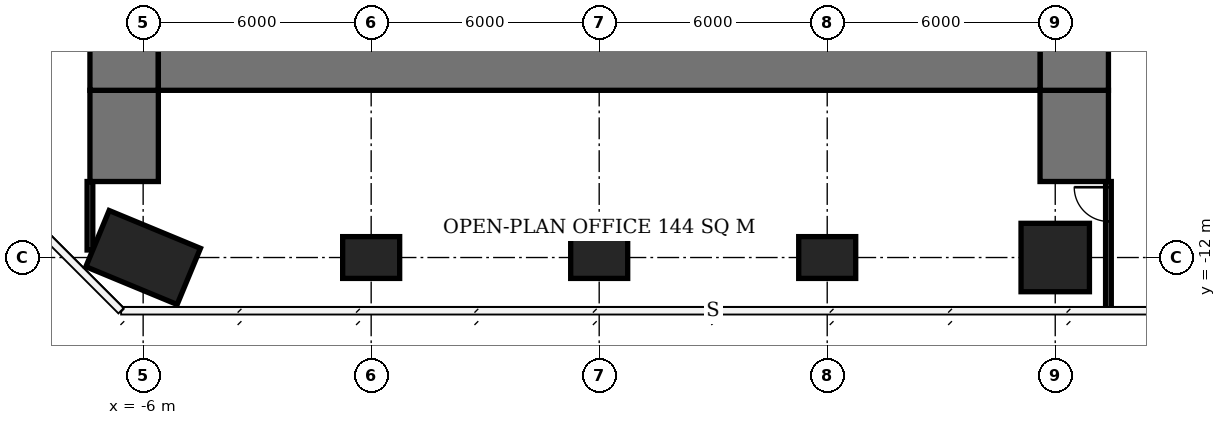
"""IFC4 building model, lengths in metres.
Left out: names, types, materials, properties, quantities, classifications, styles, units other than length and angle.
Written with IfcOpenShell. Run it as: python <this file> out.ifc"""

import sys

from ifc_helpers import new_model, si_unit, direction, frame, frame_2d, origin, origin_2d, place, context, subcontext, project, spatial, rectangle, extrude, element, fill, save


model = new_model("IFC4")
c1 = context("Model", 3, precision=1e-05, world=origin(), true_north=direction((0.0, 1.0)))
c2 = subcontext(c1, "Body", "Model", "MODEL_VIEW")
j1 = project(units=[si_unit("LENGTHUNIT", "METRE"), si_unit("PLANEANGLEUNIT", "RADIAN")], contexts=[c1])
p1 = place(None, origin())
s1 = spatial("IfcSite", under=j1, at=p1, CompositionType="ELEMENT")
p2 = place(p1, origin())
s2 = spatial("IfcBuilding", under=s1, at=p2, CompositionType="ELEMENT")
p3 = place(p2, frame((0.0, 0.0, 177.2)))
s3 = spatial("IfcBuildingStorey", under=s2, at=p3, CompositionType="ELEMENT", Elevation=177.2)
p4 = place(p3, frame((-6.0, -12.0, 0.0), z_axis=(0.0, 0.0, 1.0), x_axis=(-0.923879532511, 0.382683432365, 0.0)))
e1 = element("IfcColumn", 1, at=p4, inside=s3, PredefinedType="COLUMN", context=c2, shape_type="SweptSolid", body=[
    extrude(rectangle(XDim=2.6, YDim=1.6, at=origin_2d()), origin(), (0.0, 0.0, 1.0), 3.9),
])
for number, where, z_axis, x_axis in (
    (2, (0.0, -12.0, 0.0), (0.0, 0.0, 1.0), (1.0, 0.0, 0.0)),
    (3, (6.0, -12.0, 0.0), (0.0, 0.0, 1.0), (1.0, 0.0, 0.0)),
    (4, (12.0, -12.0, 0.0), (0.0, 0.0, 1.0), (1.0, 0.0, 0.0)),
):
    element("IfcColumn", number, at=place(p3, frame(where, z_axis=z_axis, x_axis=x_axis)), inside=s3, PredefinedType="COLUMN", context=c2, shape_type="SweptSolid", body=[
        extrude(rectangle(XDim=1.5, YDim=1.1, at=origin_2d()), origin(), (0.0, 0.0, 1.0), 3.9),
    ])
p5 = place(p3, frame((18.0, -12.0, 0.0), z_axis=(0.0, 0.0, 1.0), x_axis=(1.0, 0.0, 0.0)))
e5 = element("IfcColumn", 5, at=p5, inside=s3, PredefinedType="COLUMN", context=c2, shape_type="SweptSolid", body=[
    extrude(rectangle(XDim=1.8, YDim=1.8, at=origin_2d()), origin(), (0.0, 0.0, 1.0), 3.9),
])
p6 = place(p3, frame((-5.6, -6.6, 0.0), z_axis=(0.0, 0.0, 1.0), x_axis=(1.0, 0.0, 0.0)))
e6 = element("IfcWall", 6, at=p6, inside=s3, PredefinedType="SHEAR", context=c2, shape_type="SweptSolid", body=[
    extrude(rectangle(XDim=23.2, YDim=2.0, at=frame_2d((11.6, 0.0))), origin(), (0.0, 0.0, 1.0), 3.9),
])
p7 = place(p3, frame((-6.5, -7.6, 0.0), z_axis=(0.0, 0.0, 1.0), x_axis=(0.0, 1.0, 0.0)))
e7 = element("IfcWall", 7, at=p7, inside=s3, PredefinedType="SHEAR", context=c2, shape_type="SweptSolid", body=[
    extrude(rectangle(XDim=21.2, YDim=1.8, at=frame_2d((10.6, 0.0))), origin(), (0.0, 0.0, 1.0), 3.9),
])
p8 = place(p7, frame((7.8, 0.0, 0.0)))
e8 = element("IfcOpeningElement", 8, at=p8, cuts=e7, PredefinedType="OPENING", context=c2, shape_type="SweptSolid", body=[
    extrude(rectangle(XDim=1.8, YDim=2.4, at=frame_2d((0.9, 1.2))), frame((0.0, 0.91, 0.0), z_axis=(0.0, -1.0, 0.0), x_axis=(1.0, 0.0, 0.0)), (0.0, 0.0, 1.0), 1.82),
])
p9 = place(p3, frame((18.5, -7.6, 0.0), z_axis=(0.0, 0.0, 1.0), x_axis=(0.0, 1.0, 0.0)))
e9 = element("IfcWall", 9, at=p9, inside=s3, PredefinedType="SHEAR", context=c2, shape_type="SweptSolid", body=[
    extrude(rectangle(XDim=21.2, YDim=1.8, at=frame_2d((10.6, 0.0))), origin(), (0.0, 0.0, 1.0), 3.9),
])
p10 = place(p9, frame((9.2, 0.0, 0.0)))
e10 = element("IfcOpeningElement", 10, at=p10, cuts=e9, PredefinedType="OPENING", context=c2, shape_type="SweptSolid", body=[
    extrude(rectangle(XDim=1.8, YDim=2.4, at=frame_2d((0.9, 1.2))), frame((0.0, 0.91, 0.0), z_axis=(0.0, -1.0, 0.0), x_axis=(1.0, 0.0, 0.0)), (0.0, 0.0, 1.0), 1.82),
])
for number, where, z_axis, x_axis in (
    (11, (-6.5, -10.0, 0.0), (0.0, 0.0, 1.0), (0.0, 1.0, 0.0)),
    (12, (18.5, -10.0, 0.0), (0.0, 0.0, 1.0), (0.0, 1.0, 0.0)),
):
    element("IfcWall", number, at=place(p3, frame(where, z_axis=z_axis, x_axis=x_axis)), inside=s3, PredefinedType="SHEAR", context=c2, shape_type="SweptSolid", body=[
        extrude(rectangle(XDim=2.4, YDim=1.8, at=frame_2d((1.2, 0.0))), origin(), (0.0, 0.0, 1.0), 3.9),
    ])
p11 = place(p3, frame((-7.4, -11.802, 0.0), z_axis=(0.0, 0.0, 1.0), x_axis=(0.0, 1.0, 0.0)))
e13 = element("IfcWall", 13, at=p11, inside=s3, PredefinedType="PARTITIONING", context=c2, shape_type="SweptSolid", body=[
    extrude(rectangle(XDim=1.802, YDim=0.15, at=frame_2d((0.901, 0.0))), origin(), (0.0, 0.0, 1.0), 3.65),
])
p12 = place(p3, frame((19.4, -13.4, 0.0), z_axis=(0.0, 0.0, 1.0), x_axis=(0.0, 1.0, 0.0)))
e14 = element("IfcWall", 14, at=p12, inside=s3, PredefinedType="PARTITIONING", context=c2, shape_type="SweptSolid", body=[
    extrude(rectangle(XDim=3.4, YDim=0.15, at=frame_2d((1.7, 0.0))), origin(), (0.0, 0.0, 1.0), 3.65),
])
p13 = place(p12, frame((2.35, 0.0, 0.0)))
e15 = element("IfcOpeningElement", 15, at=p13, cuts=e14, PredefinedType="OPENING", context=c2, shape_type="SweptSolid", body=[
    extrude(rectangle(XDim=0.9, YDim=2.1, at=frame_2d((0.45, 1.05))), frame((0.0, 0.085, 0.0), z_axis=(0.0, -1.0, 0.0), x_axis=(1.0, 0.0, 0.0)), (0.0, 0.0, 1.0), 0.17),
])
p14 = place(p13, origin())
e16 = element("IfcDoor", 16, at=p14, inside=s3, OperationType="SINGLE_SWING_RIGHT", PredefinedType="DOOR", context=c2, shape_type="SweptSolid", body=[
    extrude(rectangle(XDim=0.9, YDim=2.1, at=frame_2d((0.45, 1.05))), frame((0.0, 0.025, 0.0), z_axis=(0.0, -1.0, 0.0), x_axis=(1.0, 0.0, 0.0)), (0.0, 0.0, 1.0), 0.05),
])
fill(e15, e16)
save(model, sys.argv[1])
